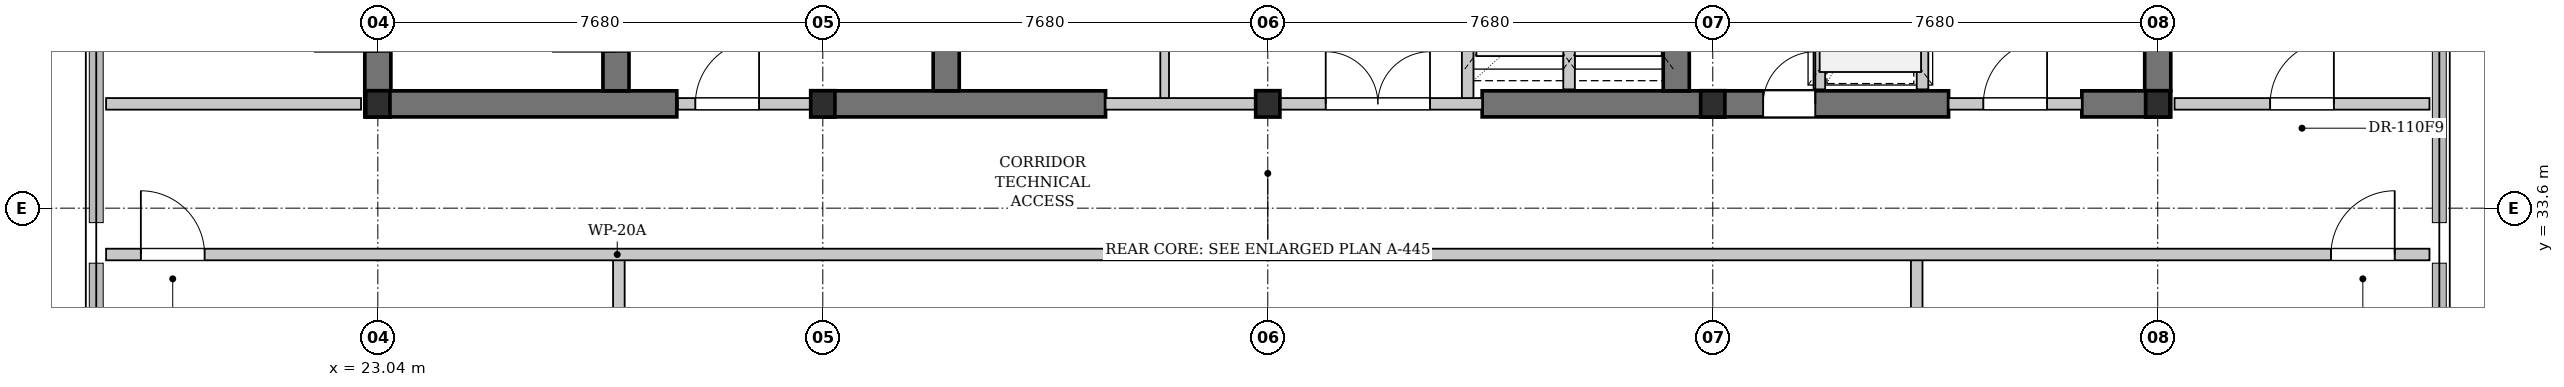
"""IFC4 building model, lengths in metres.
Left out: names, types, materials, properties, quantities, classifications, styles, units other than length and angle.
Written with IfcOpenShell. Run it as: python <this file> out.ifc"""

import sys

from ifc_helpers import new_model, si_unit, direction, frame, frame_2d, origin, origin_2d, place, context, subcontext, project, spatial, rectangle, i_section, extrude, element, fill, save


model = new_model("IFC4")
c1 = context("Model", 3, precision=1e-05, world=origin(), true_north=direction((0.0, 1.0)))
c2 = subcontext(c1, "Body", "Model", "MODEL_VIEW")
j1 = project(units=[si_unit("LENGTHUNIT", "METRE"), si_unit("PLANEANGLEUNIT", "RADIAN")], contexts=[c1])
p1 = place(None, origin())
s1 = spatial("IfcSite", under=j1, at=p1, CompositionType="ELEMENT")
p2 = place(p1, origin())
s2 = spatial("IfcBuilding", under=s1, at=p2, CompositionType="ELEMENT")
p3 = place(p2, frame((0.0, 0.0, 196.1)))
s3 = spatial("IfcBuildingStorey", under=s2, at=p3, CompositionType="ELEMENT", Elevation=196.1)
p4 = place(p3, frame((22.815, 35.4, 0.0), z_axis=(0.0, 0.0, 1.0), x_axis=(1.0, 0.0, 0.0)))
e1 = element("IfcWall", 1, at=p4, inside=s3, PredefinedType="SHEAR", context=c2, shape_type="SweptSolid", body=[
    extrude(rectangle(XDim=5.385, YDim=0.45, at=frame_2d((2.692, 0.0))), origin(), (0.0, 0.0, 1.0), 3.78),
])
p5 = place(p3, frame((30.72, 35.4, 0.0), z_axis=(0.0, 0.0, 1.0), x_axis=(1.0, 0.0, 0.0)))
e2 = element("IfcWall", 2, at=p5, inside=s3, PredefinedType="SHEAR", context=c2, shape_type="SweptSolid", body=[
    extrude(rectangle(XDim=4.88, YDim=0.45, at=frame_2d((2.44, 0.0))), origin(), (0.0, 0.0, 1.0), 3.78),
])
p6 = place(p3, frame((42.1, 35.4, 0.0), z_axis=(0.0, 0.0, 1.0), x_axis=(1.0, 0.0, 0.0)))
e3 = element("IfcWall", 3, at=p6, inside=s3, PredefinedType="SHEAR", context=c2, shape_type="SweptSolid", body=[
    extrude(rectangle(XDim=8.05, YDim=0.45, at=frame_2d((4.025, 0.0))), origin(), (0.0, 0.0, 1.0), 3.78),
])
p7 = place(p6, frame((4.85, 0.0, 0.0)))
e4 = element("IfcOpeningElement", 4, at=p7, cuts=e3, PredefinedType="OPENING", context=c2, shape_type="SweptSolid", body=[
    extrude(rectangle(XDim=0.9, YDim=2.15, at=frame_2d((0.45, 1.075))), frame((0.0, 0.235, 0.0), z_axis=(0.0, -1.0, 0.0), x_axis=(1.0, 0.0, 0.0)), (0.0, 0.0, 1.0), 0.47),
])
p8 = place(p3, frame((52.45, 35.4, 0.0), z_axis=(0.0, 0.0, 1.0), x_axis=(1.0, 0.0, 0.0)))
e5 = element("IfcWall", 5, at=p8, inside=s3, PredefinedType="SHEAR", context=c2, shape_type="SweptSolid", body=[
    extrude(rectangle(XDim=1.535, YDim=0.45, at=frame_2d((0.768, 0.0))), origin(), (0.0, 0.0, 1.0), 3.78),
])
p9 = place(p3, frame((23.04, 35.625, 0.0), z_axis=(0.0, 0.0, 1.0), x_axis=(0.0, 1.0, 0.0)))
e6 = element("IfcWall", 6, at=p9, inside=s3, PredefinedType="SHEAR", context=c2, shape_type="SweptSolid", body=[
    extrude(rectangle(XDim=10.35, YDim=0.45, at=frame_2d((5.175, 0.0))), origin(), (0.0, 0.0, 1.0), 3.78),
])
p10 = place(p9, frame((0.675, 0.0, 0.0)))
e7 = element("IfcOpeningElement", 7, at=p10, cuts=e6, PredefinedType="OPENING", context=c2, shape_type="SweptSolid", body=[
    extrude(rectangle(XDim=1.1, YDim=2.15, at=frame_2d((0.55, 1.075))), frame((0.0, 0.235, 0.0), z_axis=(0.0, -1.0, 0.0), x_axis=(1.0, 0.0, 0.0)), (0.0, 0.0, 1.0), 0.47),
])
p11 = place(p3, frame((27.15, 35.625, 0.0), z_axis=(0.0, 0.0, 1.0), x_axis=(0.0, 1.0, 0.0)))
e8 = element("IfcWall", 8, at=p11, inside=s3, PredefinedType="SHEAR", context=c2, shape_type="SweptSolid", body=[
    extrude(rectangle(XDim=10.35, YDim=0.45, at=frame_2d((5.175, 0.0))), origin(), (0.0, 0.0, 1.0), 3.78),
])
p12 = place(p11, frame((0.675, 0.0, 0.0)))
e9 = element("IfcOpeningElement", 9, at=p12, cuts=e8, PredefinedType="OPENING", context=c2, shape_type="SweptSolid", body=[
    extrude(rectangle(XDim=1.1, YDim=2.15, at=frame_2d((0.55, 1.075))), frame((0.0, 0.235, 0.0), z_axis=(0.0, -1.0, 0.0), x_axis=(1.0, 0.0, 0.0)), (0.0, 0.0, 1.0), 0.47),
])
for number, where, z_axis, x_axis in (
    (10, (32.85, 35.625, 0.0), (0.0, 0.0, 1.0), (0.0, 1.0, 0.0)),
    (11, (45.45, 35.625, 0.0), (0.0, 0.0, 1.0), (0.0, 1.0, 0.0)),
    (12, (53.76, 35.625, 0.0), (0.0, 0.0, 1.0), (0.0, 1.0, 0.0)),
):
    element("IfcWall", number, at=place(p3, frame(where, z_axis=z_axis, x_axis=x_axis)), inside=s3, PredefinedType="SHEAR", context=c2, shape_type="SweptSolid", body=[
        extrude(rectangle(XDim=10.35, YDim=0.45, at=frame_2d((5.175, 0.0))), origin(), (0.0, 0.0, 1.0), 3.78),
    ])
for number, where, z_axis, x_axis in (
    (13, (23.04, 35.4, 0.0), (0.0, 0.0, 1.0), (1.0, 0.0, 0.0)),
    (14, (30.72, 35.4, 0.0), (0.0, 0.0, 1.0), (1.0, 0.0, 0.0)),
    (15, (38.4, 35.4, 0.0), (0.0, 0.0, 1.0), (1.0, 0.0, 0.0)),
    (16, (46.08, 35.4, 0.0), (0.0, 0.0, 1.0), (1.0, 0.0, 0.0)),
    (17, (53.76, 35.4, 0.0), (0.0, 0.0, 1.0), (1.0, 0.0, 0.0)),
):
    element("IfcColumn", number, at=place(p3, frame(where, z_axis=z_axis, x_axis=x_axis)), inside=s3, PredefinedType="COLUMN", context=c2, shape_type="SweptSolid", body=[
        extrude(i_section(OverallWidth=0.418, OverallDepth=0.455, WebThickness=0.042, FlangeThickness=0.068, FilletRadius=0.015, at=origin_2d()), origin(), (0.0, 0.0, 1.0), 4.2),
    ])
p13 = place(p3, frame((28.22, 35.4, 0.0), z_axis=(0.0, 0.0, 1.0), x_axis=(1.0, 0.0, 0.0)))
e18 = element("IfcWall", 18, at=p13, inside=s3, PredefinedType="PARTITIONING", context=c2, shape_type="SweptSolid", body=[
    extrude(rectangle(XDim=2.5, YDim=0.2, at=frame_2d((1.25, 0.0))), origin(), (0.0, 0.0, 1.0), 2.961),
])
p14 = place(p13, frame((0.3, 0.0, 0.0)))
e19 = element("IfcOpeningElement", 19, at=p14, cuts=e18, PredefinedType="OPENING", context=c2, shape_type="SweptSolid", body=[
    extrude(rectangle(XDim=1.1, YDim=2.15, at=frame_2d((0.55, 1.075))), frame((0.0, 0.11, 0.0), z_axis=(0.0, -1.0, 0.0), x_axis=(1.0, 0.0, 0.0)), (0.0, 0.0, 1.0), 0.22),
])
p15 = place(p3, frame((35.6, 35.4, 0.0), z_axis=(0.0, 0.0, 1.0), x_axis=(1.0, 0.0, 0.0)))
e20 = element("IfcWall", 20, at=p15, inside=s3, PredefinedType="PARTITIONING", context=c2, shape_type="SweptSolid", body=[
    extrude(rectangle(XDim=6.5, YDim=0.2, at=frame_2d((3.25, 0.0))), origin(), (0.0, 0.0, 1.0), 2.961),
])
p16 = place(p15, frame((3.8, 0.0, 0.0)))
e21 = element("IfcOpeningElement", 21, at=p16, cuts=e20, PredefinedType="OPENING", context=c2, shape_type="SweptSolid", body=[
    extrude(rectangle(XDim=1.8, YDim=2.3, at=frame_2d((0.9, 1.15))), frame((0.0, 0.11, 0.0), z_axis=(0.0, -1.0, 0.0), x_axis=(1.0, 0.0, 0.0)), (0.0, 0.0, 1.0), 0.22),
])
p17 = place(p3, frame((36.62, 35.5, 0.0), z_axis=(0.0, 0.0, 1.0), x_axis=(0.0, 1.0, 0.0)))
e22 = element("IfcWall", 22, at=p17, inside=s3, PredefinedType="PARTITIONING", context=c2, shape_type="SweptSolid", body=[
    extrude(rectangle(XDim=10.42, YDim=0.15, at=frame_2d((5.21, 0.0))), origin(), (0.0, 0.0, 1.0), 3.78),
])
p18 = place(p17, frame((3.92, 0.0, 0.0)))
e23 = element("IfcOpeningElement", 23, at=p18, cuts=e22, PredefinedType="OPENING", context=c2, shape_type="SweptSolid", body=[
    extrude(rectangle(XDim=0.9, YDim=2.15, at=frame_2d((0.45, 1.075))), frame((0.0, 0.085, 0.0), z_axis=(0.0, -1.0, 0.0), x_axis=(1.0, 0.0, 0.0)), (0.0, 0.0, 1.0), 0.17),
])
p19 = place(p17, frame((5.85, 0.0, 0.0)))
e24 = element("IfcOpeningElement", 24, at=p19, cuts=e22, PredefinedType="OPENING", context=c2, shape_type="SweptSolid", body=[
    extrude(rectangle(XDim=0.9, YDim=2.15, at=frame_2d((0.45, 1.075))), frame((0.0, 0.085, 0.0), z_axis=(0.0, -1.0, 0.0), x_axis=(1.0, 0.0, 0.0)), (0.0, 0.0, 1.0), 0.17),
])
p20 = place(p3, frame((43.6, 35.65, 0.0), z_axis=(0.0, 0.0, 1.0), x_axis=(0.0, 1.0, 0.0)))
e25 = element("IfcWall", 25, at=p20, inside=s3, PredefinedType="PARTITIONING", context=c2, shape_type="SweptSolid", body=[
    extrude(rectangle(XDim=3.25, YDim=0.2, at=frame_2d((1.625, 0.0))), origin(), (0.0, 0.0, 1.0), 3.78),
])
p21 = place(p3, frame((41.85, 35.5, 0.0), z_axis=(0.0, 0.0, 1.0), x_axis=(0.0, 1.0, 0.0)))
e26 = element("IfcWall", 26, at=p21, inside=s3, PredefinedType="PARTITIONING", context=c2, shape_type="SweptSolid", body=[
    extrude(rectangle(XDim=3.4, YDim=0.2, at=frame_2d((1.7, 0.0))), origin(), (0.0, 0.0, 1.0), 3.78),
])
p22 = place(p3, frame((50.15, 35.4, 0.0), z_axis=(0.0, 0.0, 1.0), x_axis=(1.0, 0.0, 0.0)))
e27 = element("IfcWall", 27, at=p22, inside=s3, PredefinedType="PARTITIONING", context=c2, shape_type="SweptSolid", body=[
    extrude(rectangle(XDim=2.3, YDim=0.2, at=frame_2d((1.15, 0.0))), origin(), (0.0, 0.0, 1.0), 2.961),
])
p23 = place(p22, frame((0.6, 0.0, 0.0)))
e28 = element("IfcOpeningElement", 28, at=p23, cuts=e27, PredefinedType="OPENING", context=c2, shape_type="SweptSolid", body=[
    extrude(rectangle(XDim=1.1, YDim=2.15, at=frame_2d((0.55, 1.075))), frame((0.0, 0.11, 0.0), z_axis=(0.0, -1.0, 0.0), x_axis=(1.0, 0.0, 0.0)), (0.0, 0.0, 1.0), 0.22),
])
p24 = place(p3, frame((49.7, 35.65, 0.0), z_axis=(0.0, 0.0, 1.0), x_axis=(0.0, 1.0, 0.0)))
e29 = element("IfcWall", 29, at=p24, inside=s3, PredefinedType="PARTITIONING", context=c2, shape_type="SweptSolid", body=[
    extrude(rectangle(XDim=3.15, YDim=0.2, at=frame_2d((1.575, 0.0))), origin(), (0.0, 0.0, 1.0), 3.78),
])
p25 = place(p24, frame((0.85, 0.0, 0.0)))
e30 = element("IfcOpeningElement", 30, at=p25, cuts=e29, PredefinedType="OPENING", context=c2, shape_type="SweptSolid", body=[
    extrude(rectangle(XDim=1.2, YDim=2.2, at=frame_2d((0.6, 1.1))), frame((0.0, 0.11, 0.0), z_axis=(0.0, -1.0, 0.0), x_axis=(1.0, 0.0, 0.0)), (0.0, 0.0, 1.0), 0.22),
])
p26 = place(p3, frame((47.92, 35.65, 0.0), z_axis=(0.0, 0.0, 1.0), x_axis=(0.0, 1.0, 0.0)))
e31 = element("IfcWall", 31, at=p26, inside=s3, PredefinedType="PARTITIONING", context=c2, shape_type="SweptSolid", body=[
    extrude(rectangle(XDim=3.15, YDim=0.2, at=frame_2d((1.575, 0.0))), origin(), (0.0, 0.0, 1.0), 3.78),
])
p27 = place(p3, frame((18.35, 35.4, 0.0), z_axis=(0.0, 0.0, 1.0), x_axis=(1.0, 0.0, 0.0)))
e32 = element("IfcWall", 32, at=p27, inside=s3, PredefinedType="PARTITIONING", context=c2, shape_type="SweptSolid", body=[
    extrude(rectangle(XDim=4.4, YDim=0.2, at=frame_2d((2.2, 0.0))), origin(), (0.0, 0.0, 1.0), 3.78),
])
p28 = place(p3, frame((54.05, 35.4, 0.0), z_axis=(0.0, 0.0, 1.0), x_axis=(1.0, 0.0, 0.0)))
e33 = element("IfcWall", 33, at=p28, inside=s3, PredefinedType="PARTITIONING", context=c2, shape_type="SweptSolid", body=[
    extrude(rectangle(XDim=4.4, YDim=0.2, at=frame_2d((2.2, 0.0))), origin(), (0.0, 0.0, 1.0), 3.78),
])
p29 = place(p28, frame((1.65, 0.0, 0.0)))
e34 = element("IfcOpeningElement", 34, at=p29, cuts=e33, PredefinedType="OPENING", context=c2, shape_type="SweptSolid", body=[
    extrude(rectangle(XDim=1.1, YDim=2.15, at=frame_2d((0.55, 1.075))), frame((0.0, 0.11, 0.0), z_axis=(0.0, -1.0, 0.0), x_axis=(1.0, 0.0, 0.0)), (0.0, 0.0, 1.0), 0.22),
])
for number, where, z_axis, x_axis in (
    (35, (27.2, 23.58, 0.0), (0.0, 0.0, 1.0), (0.0, 1.0, 0.0)),
    (36, (49.6, 23.58, 0.0), (0.0, 0.0, 1.0), (0.0, 1.0, 0.0)),
):
    element("IfcWall", number, at=place(p3, frame(where, z_axis=z_axis, x_axis=x_axis)), inside=s3, PredefinedType="PARTITIONING", context=c2, shape_type="SweptSolid", body=[
        extrude(rectangle(XDim=9.22, YDim=0.2, at=frame_2d((4.61, 0.0))), origin(), (0.0, 0.0, 1.0), 3.78),
    ])
p30 = place(p3, frame((18.35, 32.8, 0.0), z_axis=(0.0, 0.0, 1.0), x_axis=(1.0, 0.0, 0.0)))
e37 = element("IfcWall", 37, at=p30, inside=s3, PredefinedType="PARTITIONING", context=c2, shape_type="SweptSolid", body=[
    extrude(rectangle(XDim=40.1, YDim=0.2, at=frame_2d((20.05, 0.0))), origin(), (0.0, 0.0, 1.0), 3.78),
])
p31 = place(p30, frame((0.6, 0.0, 0.0)))
e38 = element("IfcOpeningElement", 38, at=p31, cuts=e37, PredefinedType="OPENING", context=c2, shape_type="SweptSolid", body=[
    extrude(rectangle(XDim=1.1, YDim=2.15, at=frame_2d((0.55, 1.075))), frame((0.0, 0.11, 0.0), z_axis=(0.0, -1.0, 0.0), x_axis=(1.0, 0.0, 0.0)), (0.0, 0.0, 1.0), 0.22),
])
p32 = place(p30, frame((38.4, 0.0, 0.0)))
e39 = element("IfcOpeningElement", 39, at=p32, cuts=e37, PredefinedType="OPENING", context=c2, shape_type="SweptSolid", body=[
    extrude(rectangle(XDim=1.1, YDim=2.15, at=frame_2d((0.55, 1.075))), frame((0.0, 0.11, 0.0), z_axis=(0.0, -1.0, 0.0), x_axis=(1.0, 0.0, 0.0)), (0.0, 0.0, 1.0), 0.22),
])
p33 = place(p14, origin())
e40 = element("IfcDoor", 40, at=p33, inside=s3, OperationType="SINGLE_SWING_RIGHT", PredefinedType="DOOR", context=c2, shape_type="SweptSolid", body=[
    extrude(rectangle(XDim=1.1, YDim=2.15, at=frame_2d((0.55, 1.075))), frame((0.0, 0.025, 0.0), z_axis=(0.0, -1.0, 0.0), x_axis=(1.0, 0.0, 0.0)), (0.0, 0.0, 1.0), 0.05),
])
fill(e19, e40)
p34 = place(p16, origin())
e41 = element("IfcDoor", 41, at=p34, inside=s3, OperationType="DOUBLE_DOOR_SINGLE_SWING", PredefinedType="DOOR", context=c2, shape_type="SweptSolid", body=[
    extrude(rectangle(XDim=1.8, YDim=2.3, at=frame_2d((0.9, 1.15))), frame((0.0, 0.025, 0.0), z_axis=(0.0, -1.0, 0.0), x_axis=(1.0, 0.0, 0.0)), (0.0, 0.0, 1.0), 0.05),
])
fill(e21, e41)
p35 = place(p23, origin())
e42 = element("IfcDoor", 42, at=p35, inside=s3, OperationType="SINGLE_SWING_RIGHT", PredefinedType="DOOR", context=c2, shape_type="SweptSolid", body=[
    extrude(rectangle(XDim=1.1, YDim=2.15, at=frame_2d((0.55, 1.075))), frame((0.0, 0.025, 0.0), z_axis=(0.0, -1.0, 0.0), x_axis=(1.0, 0.0, 0.0)), (0.0, 0.0, 1.0), 0.05),
])
fill(e28, e42)
p36 = place(p29, origin())
e43 = element("IfcDoor", 43, at=p36, inside=s3, OperationType="SINGLE_SWING_RIGHT", PredefinedType="DOOR", context=c2, shape_type="SweptSolid", body=[
    extrude(rectangle(XDim=1.1, YDim=2.15, at=frame_2d((0.55, 1.075))), frame((0.0, 0.025, 0.0), z_axis=(0.0, -1.0, 0.0), x_axis=(1.0, 0.0, 0.0)), (0.0, 0.0, 1.0), 0.05),
])
fill(e34, e43)
p37 = place(p31, origin())
e44 = element("IfcDoor", 44, at=p37, inside=s3, OperationType="SINGLE_SWING_LEFT", PredefinedType="DOOR", context=c2, shape_type="SweptSolid", body=[
    extrude(rectangle(XDim=1.1, YDim=2.15, at=frame_2d((0.55, 1.075))), frame((0.0, 0.025, 0.0), z_axis=(0.0, -1.0, 0.0), x_axis=(1.0, 0.0, 0.0)), (0.0, 0.0, 1.0), 0.05),
])
fill(e38, e44)
p38 = place(p32, origin())
e45 = element("IfcDoor", 45, at=p38, inside=s3, OperationType="SINGLE_SWING_RIGHT", PredefinedType="DOOR", context=c2, shape_type="SweptSolid", body=[
    extrude(rectangle(XDim=1.1, YDim=2.15, at=frame_2d((0.55, 1.075))), frame((0.0, 0.025, 0.0), z_axis=(0.0, -1.0, 0.0), x_axis=(1.0, 0.0, 0.0)), (0.0, 0.0, 1.0), 0.05),
])
fill(e39, e45)
p39 = place(p7, origin())
e46 = element("IfcDoor", 46, at=p39, inside=s3, OperationType="SINGLE_SWING_RIGHT", PredefinedType="DOOR", context=c2, shape_type="SweptSolid", body=[
    extrude(rectangle(XDim=0.9, YDim=2.15, at=frame_2d((0.45, 1.075))), frame((0.0, 0.025, 0.0), z_axis=(0.0, -1.0, 0.0), x_axis=(1.0, 0.0, 0.0)), (0.0, 0.0, 1.0), 0.05),
])
fill(e4, e46)
save(model, sys.argv[1])
